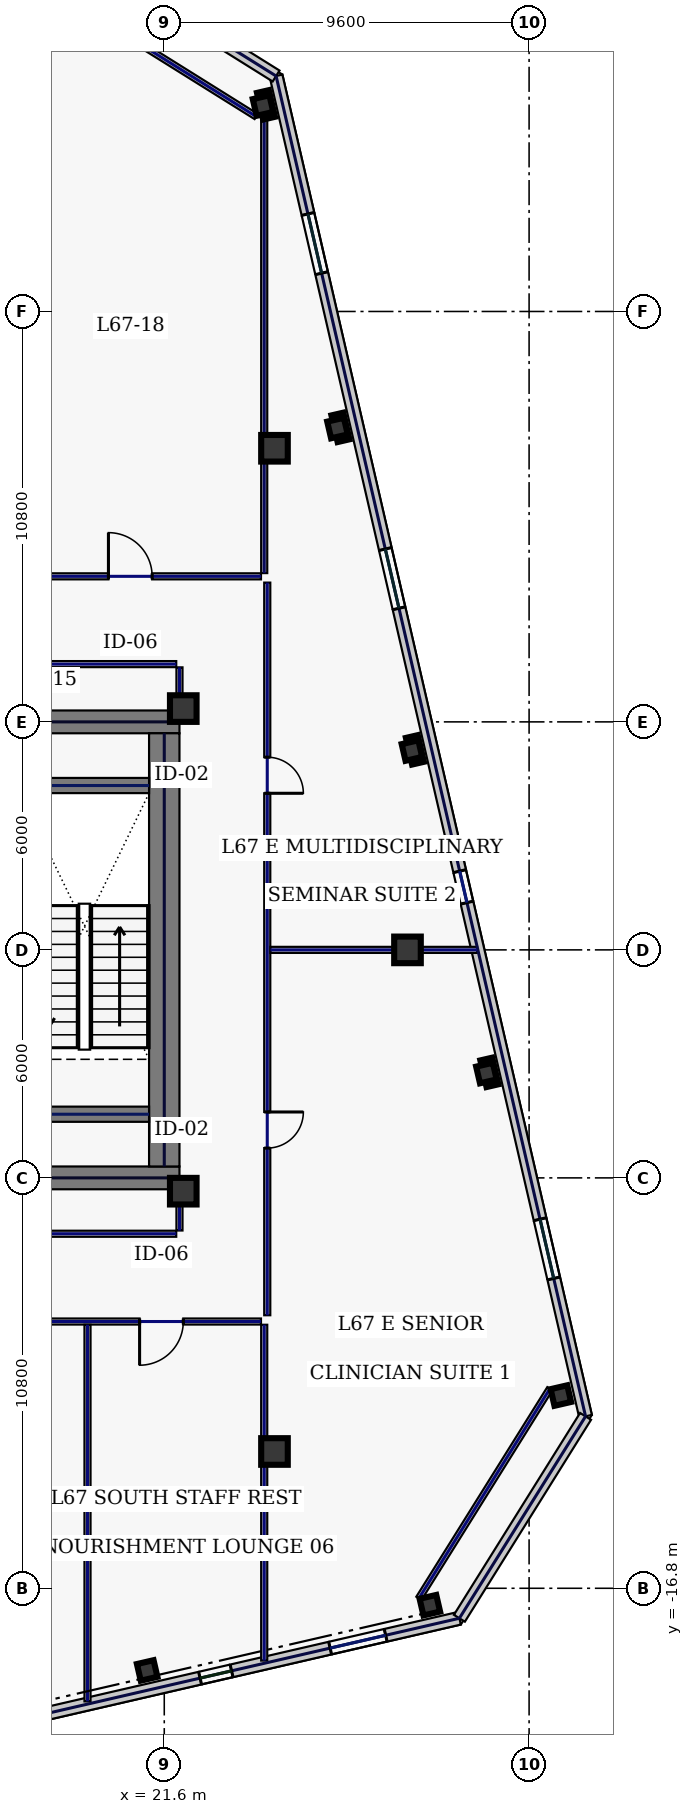
"""IFC4 building model, lengths in metres.
Left out: names, types, materials, properties, quantities, classifications, styles, units other than length and angle.
Written with IfcOpenShell. Run it as: python <this file> out.ifc"""

import sys

from ifc_helpers import new_model, si_unit, direction, frame, frame_2d, origin, origin_2d, place, context, subcontext, project, spatial, rectangle, hollow_rectangle, extrude, element, fill, save


model = new_model("IFC4")
c1 = context("Model", 3, precision=1e-05, world=origin(), true_north=direction((0.0, 1.0)))
c2 = subcontext(c1, "Body", "Model", "MODEL_VIEW")
j1 = project(units=[si_unit("LENGTHUNIT", "METRE"), si_unit("PLANEANGLEUNIT", "RADIAN")], contexts=[c1])
p1 = place(None, origin())
s1 = spatial("IfcSite", under=j1, at=p1, CompositionType="ELEMENT")
p2 = place(p1, origin())
s2 = spatial("IfcBuilding", under=s1, at=p2, CompositionType="ELEMENT")
p3 = place(p2, frame((0.0, 0.0, 289.0)))
s3 = spatial("IfcBuildingStorey", under=s2, at=p3, CompositionType="ELEMENT", Elevation=289.0)
for number, where, z_axis, x_axis in (
    (1, (10.5, 6.0, 0.0), (0.0, 0.0, 1.0), (1.0, 0.0, 0.0)),
    (2, (10.5, -6.0, 0.0), (0.0, 0.0, 1.0), (1.0, 0.0, 0.0)),
):
    element("IfcWall", number, at=place(p3, frame(where, z_axis=z_axis, x_axis=x_axis)), inside=s3, PredefinedType="SHEAR", context=c2, shape_type="SweptSolid", body=[
        extrude(rectangle(XDim=11.5, YDim=0.6, at=frame_2d((5.75, 0.0))), origin(), (0.0, 0.0, 1.0), 3.74),
    ])
p4 = place(p3, frame((21.6, -5.7, 0.0), z_axis=(0.0, 0.0, 1.0), x_axis=(0.0, 1.0, 0.0)))
e3 = element("IfcWall", 3, at=p4, inside=s3, PredefinedType="SHEAR", context=c2, shape_type="SweptSolid", body=[
    extrude(rectangle(XDim=11.4, YDim=0.8, at=frame_2d((5.7, 0.0))), origin(), (0.0, 0.0, 1.0), 3.74),
])
for number, where, z_axis, x_axis in (
    (4, (17.8, -4.325, 0.0), (0.0, 0.0, 1.0), (1.0, 0.0, 0.0)),
    (5, (17.8, 4.325, 0.0), (0.0, 0.0, 1.0), (1.0, 0.0, 0.0)),
):
    element("IfcWall", number, at=place(p3, frame(where, z_axis=z_axis, x_axis=x_axis)), inside=s3, PredefinedType="SHEAR", context=c2, shape_type="SweptSolid", body=[
        extrude(rectangle(XDim=3.4, YDim=0.4, at=frame_2d((1.7, 0.0))), origin(), (0.0, 0.0, 1.0), 3.74),
    ])
for number, where, z_axis, x_axis in (
    (6, (22.1, -6.35, 0.0), (0.0, 0.0, 1.0), (1.0, 0.0, 0.0)),
    (7, (22.1, 6.35, 0.0), (0.0, 0.0, 1.0), (1.0, 0.0, 0.0)),
    (8, (24.5, -13.2, 0.0), (0.0, 0.0, 1.0), (1.0, 0.0, 0.0)),
    (9, (24.5, 13.2, 0.0), (0.0, 0.0, 1.0), (1.0, 0.0, 0.0)),
    (10, (28.0, 0.0, 0.0), (0.0, 0.0, 1.0), (1.0, 0.0, 0.0)),
):
    element("IfcColumn", number, at=place(p3, frame(where, z_axis=z_axis, x_axis=x_axis)), inside=s3, PredefinedType="COLUMN", context=c2, shape_type="SweptSolid", body=[
        extrude(hollow_rectangle(XDim=0.7, YDim=0.7, WallThickness=0.032, at=origin_2d()), origin(), (0.0, 0.0, 1.0), 3.74),
    ])
for number, where, z_axis, x_axis in (
    (11, (21.15, -18.962, 0.0), (0.0, 0.0, 1.0), (0.974, 0.225, 0.0)),
    (12, (28.589, -17.245, 0.0), (0.0, 0.0, 1.0), (0.974, 0.225, 0.0)),
    (13, (32.036, -11.728, 0.0), (0.0, 0.0, 1.0), (0.974, 0.225, 0.0)),
    (14, (30.077, -3.241, 0.0), (0.0, 0.0, 1.0), (0.974, 0.225, 0.0)),
    (15, (28.117, 5.246, 0.0), (0.0, 0.0, 1.0), (0.974, 0.225, 0.0)),
    (16, (26.158, 13.732, 0.0), (0.0, 0.0, 1.0), (0.974, 0.225, 0.0)),
    (17, (24.198, 22.219, 0.0), (0.0, 0.0, 1.0), (0.974, 0.225, 0.0)),
):
    element("IfcColumn", number, at=place(p3, frame(where, z_axis=z_axis, x_axis=x_axis)), inside=s3, PredefinedType="COLUMN", context=c2, shape_type="SweptSolid", body=[
        extrude(hollow_rectangle(XDim=0.45, YDim=0.45, WallThickness=0.022, at=origin_2d()), origin(), (0.0, 0.0, 1.0), 3.74),
    ])
p5 = place(p3, frame((12.445, -21.495, 0.0), z_axis=(0.0, 0.0, 1.0), x_axis=(0.974369392164, 0.224953967767, 0.0)))
e18 = element("IfcWall", 18, at=p5, inside=s3, PredefinedType="STANDARD", context=c2, shape_type="SweptSolid", body=[
    extrude(rectangle(XDim=17.366, YDim=0.34, at=frame_2d((8.683, 0.0))), origin(), (0.0, 0.0, 1.0), 3.74),
])
p6 = place(p5, frame((2.729, 0.0, 0.9)))
e19 = element("IfcOpeningElement", 19, at=p6, cuts=e18, PredefinedType="OPENING", context=c2, shape_type="SweptSolid", body=[
    extrude(rectangle(XDim=1.5, YDim=2.0, at=frame_2d((0.75, 1.0))), frame((0.0, 0.18, 0.0), z_axis=(0.0, -1.0, 0.0), x_axis=(1.0, 0.0, 0.0)), (0.0, 0.0, 1.0), 0.36),
])
p7 = place(p5, frame((10.363, 0.0, 0.9)))
e20 = element("IfcOpeningElement", 20, at=p7, cuts=e18, PredefinedType="OPENING", context=c2, shape_type="SweptSolid", body=[
    extrude(rectangle(XDim=0.85, YDim=1.85, at=frame_2d((0.425, 0.925))), frame((0.0, 0.18, 0.0), z_axis=(0.0, -1.0, 0.0), x_axis=(1.0, 0.0, 0.0)), (0.0, 0.0, 1.0), 0.36),
])
p8 = place(p5, frame((13.875, 0.0, 0.9)))
e21 = element("IfcOpeningElement", 21, at=p8, cuts=e18, PredefinedType="OPENING", context=c2, shape_type="SweptSolid", body=[
    extrude(rectangle(XDim=1.5, YDim=2.0, at=frame_2d((0.75, 1.0))), frame((0.0, 0.18, 0.0), z_axis=(0.0, -1.0, 0.0), x_axis=(1.0, 0.0, 0.0)), (0.0, 0.0, 1.0), 0.36),
])
p9 = place(p3, frame((19.229, 26.316, 0.0), z_axis=(0.0, 0.0, 1.0), x_axis=(-0.974372473594, -0.224940620392, 0.0)))
e22 = element("IfcWall", 22, at=p9, inside=s3, PredefinedType="STANDARD", context=c2, shape_type="SweptSolid", body=[
    extrude(rectangle(XDim=17.366, YDim=0.34, at=frame_2d((8.683, 0.0))), origin(), (0.0, 0.0, 1.0), 3.74),
])
p10 = place(p9, frame((13.187, 0.0, 1.0)))
e23 = element("IfcOpeningElement", 23, at=p10, cuts=e22, PredefinedType="OPENING", context=c2, shape_type="SweptSolid", body=[
    extrude(rectangle(XDim=1.4, YDim=1.85, at=frame_2d((0.7, 0.925))), frame((0.0, 0.18, 0.0), z_axis=(0.0, -1.0, 0.0), x_axis=(1.0, 0.0, 0.0)), (0.0, 0.0, 1.0), 0.36),
])
p11 = place(p9, frame((9.676, 0.0, 1.0)))
e24 = element("IfcOpeningElement", 24, at=p11, cuts=e22, PredefinedType="OPENING", context=c2, shape_type="SweptSolid", body=[
    extrude(rectangle(XDim=1.4, YDim=1.85, at=frame_2d((0.7, 0.925))), frame((0.0, 0.18, 0.0), z_axis=(0.0, -1.0, 0.0), x_axis=(1.0, 0.0, 0.0)), (0.0, 0.0, 1.0), 0.36),
])
p12 = place(p9, frame((5.553, 0.0, 1.0)))
e25 = element("IfcOpeningElement", 25, at=p12, cuts=e22, PredefinedType="OPENING", context=c2, shape_type="SweptSolid", body=[
    extrude(rectangle(XDim=1.4, YDim=1.85, at=frame_2d((0.7, 0.925))), frame((0.0, 0.18, 0.0), z_axis=(0.0, -1.0, 0.0), x_axis=(1.0, 0.0, 0.0)), (0.0, 0.0, 1.0), 0.36),
])
p13 = place(p3, frame((32.686, -12.276, 0.0), z_axis=(0.0, 0.0, 1.0), x_axis=(-0.224953091034, 0.974369594576, 0.0)))
e26 = element("IfcWall", 26, at=p13, inside=s3, PredefinedType="STANDARD", context=c2, shape_type="SweptSolid", body=[
    extrude(rectangle(XDim=36.2, YDim=0.34, at=frame_2d((18.1, 0.0))), origin(), (0.0, 0.0, 1.0), 3.74),
])
p14 = place(p13, frame((3.725, 0.0, 0.58)))
e27 = element("IfcOpeningElement", 27, at=p14, cuts=e26, PredefinedType="OPENING", context=c2, shape_type="SweptSolid", body=[
    extrude(rectangle(XDim=1.6, YDim=2.3, at=frame_2d((0.8, 1.15))), frame((0.0, 0.18, 0.0), z_axis=(0.0, -1.0, 0.0), x_axis=(1.0, 0.0, 0.0)), (0.0, 0.0, 1.0), 0.36),
])
p15 = place(p13, frame((13.875, 0.0, 0.75)))
e28 = element("IfcOpeningElement", 28, at=p15, cuts=e26, PredefinedType="OPENING", context=c2, shape_type="SweptSolid", body=[
    extrude(rectangle(XDim=0.85, YDim=1.85, at=frame_2d((0.425, 0.925))), frame((0.0, 0.18, 0.0), z_axis=(0.0, -1.0, 0.0), x_axis=(1.0, 0.0, 0.0)), (0.0, 0.0, 1.0), 0.36),
])
p16 = place(p13, frame((21.825, 0.0, 0.58)))
e29 = element("IfcOpeningElement", 29, at=p16, cuts=e26, PredefinedType="OPENING", context=c2, shape_type="SweptSolid", body=[
    extrude(rectangle(XDim=1.6, YDim=2.3, at=frame_2d((0.8, 1.15))), frame((0.0, 0.18, 0.0), z_axis=(0.0, -1.0, 0.0), x_axis=(1.0, 0.0, 0.0)), (0.0, 0.0, 1.0), 0.36),
])
p17 = place(p13, frame((30.875, 0.0, 0.58)))
e30 = element("IfcOpeningElement", 30, at=p17, cuts=e26, PredefinedType="OPENING", context=c2, shape_type="SweptSolid", body=[
    extrude(rectangle(XDim=1.6, YDim=2.3, at=frame_2d((0.8, 1.15))), frame((0.0, 0.18, 0.0), z_axis=(0.0, -1.0, 0.0), x_axis=(1.0, 0.0, 0.0)), (0.0, 0.0, 1.0), 0.36),
])
for number, where, z_axis, x_axis in (
    (31, (29.366, -17.589, 0.0), (0.0, 0.0, 1.0), (0.53, 0.848, 0.0)),
    (32, (24.542, 22.996, 0.0), (0.0, 0.0, 1.0), (-0.848, 0.53, 0.0)),
):
    element("IfcWall", number, at=place(p3, frame(where, z_axis=z_axis, x_axis=x_axis)), inside=s3, PredefinedType="STANDARD", context=c2, shape_type="SweptSolid", body=[
        extrude(rectangle(XDim=6.265, YDim=0.34, at=frame_2d((3.132, 0.0))), origin(), (0.0, 0.0, 1.0), 3.74),
    ])
for number, where, z_axis, x_axis in (
    (33, (28.3, -17.065, 0.0), (0.0, 0.0, 1.0), (0.53, 0.848, 0.0)),
    (34, (24.018, 21.931, 0.0), (0.0, 0.0, 1.0), (-0.848, 0.53, 0.0)),
):
    element("IfcWall", number, at=place(p3, frame(where, z_axis=z_axis, x_axis=x_axis)), inside=s3, PredefinedType="PARTITIONING", context=c2, shape_type="SweptSolid", body=[
        extrude(rectangle(XDim=6.505, YDim=0.16, at=frame_2d((3.253, 0.0))), origin(), (0.0, 0.0, 1.0), 3.74),
    ])
p18 = place(p3, frame((-24.145, 9.83, 0.0), z_axis=(0.0, 0.0, 1.0), x_axis=(1.0, 0.0, 0.0)))
e35 = element("IfcWall", 35, at=p18, inside=s3, PredefinedType="PARTITIONING", context=c2, shape_type="SweptSolid", body=[
    extrude(rectangle(XDim=48.29, YDim=0.16, at=frame_2d((24.145, 0.0))), origin(), (0.0, 0.0, 1.0), 3.74),
])
p19 = place(p18, frame((2.044, 0.0, 0.0)))
e36 = element("IfcOpeningElement", 36, at=p19, cuts=e35, PredefinedType="OPENING", context=c2, shape_type="SweptSolid", body=[
    extrude(rectangle(XDim=0.95, YDim=2.2, at=frame_2d((0.475, 1.1))), frame((0.0, 0.09, 0.0), z_axis=(0.0, -1.0, 0.0), x_axis=(1.0, 0.0, 0.0)), (0.0, 0.0, 1.0), 0.18),
])
p20 = place(p18, frame((9.165, 0.0, 0.0)))
e37 = element("IfcOpeningElement", 37, at=p20, cuts=e35, PredefinedType="OPENING", context=c2, shape_type="SweptSolid", body=[
    extrude(rectangle(XDim=0.95, YDim=2.2, at=frame_2d((0.475, 1.1))), frame((0.0, 0.09, 0.0), z_axis=(0.0, -1.0, 0.0), x_axis=(1.0, 0.0, 0.0)), (0.0, 0.0, 1.0), 0.18),
])
p21 = place(p18, frame((17.705, 0.0, 0.0)))
e38 = element("IfcOpeningElement", 38, at=p21, cuts=e35, PredefinedType="OPENING", context=c2, shape_type="SweptSolid", body=[
    extrude(rectangle(XDim=1.3, YDim=2.2, at=frame_2d((0.65, 1.1))), frame((0.0, 0.09, 0.0), z_axis=(0.0, -1.0, 0.0), x_axis=(1.0, 0.0, 0.0)), (0.0, 0.0, 1.0), 0.18),
])
p22 = place(p18, frame((24.705, 0.0, 0.0)))
e39 = element("IfcOpeningElement", 39, at=p22, cuts=e35, PredefinedType="OPENING", context=c2, shape_type="SweptSolid", body=[
    extrude(rectangle(XDim=1.3, YDim=2.2, at=frame_2d((0.65, 1.1))), frame((0.0, 0.09, 0.0), z_axis=(0.0, -1.0, 0.0), x_axis=(1.0, 0.0, 0.0)), (0.0, 0.0, 1.0), 0.18),
])
p23 = place(p18, frame((31.405, 0.0, 0.0)))
e40 = element("IfcOpeningElement", 40, at=p23, cuts=e35, PredefinedType="OPENING", context=c2, shape_type="SweptSolid", body=[
    extrude(rectangle(XDim=1.3, YDim=2.2, at=frame_2d((0.65, 1.1))), frame((0.0, 0.09, 0.0), z_axis=(0.0, -1.0, 0.0), x_axis=(1.0, 0.0, 0.0)), (0.0, 0.0, 1.0), 0.18),
])
p24 = place(p18, frame((37.98, 0.0, 0.0)))
e41 = element("IfcOpeningElement", 41, at=p24, cuts=e35, PredefinedType="OPENING", context=c2, shape_type="SweptSolid", body=[
    extrude(rectangle(XDim=0.95, YDim=2.2, at=frame_2d((0.475, 1.1))), frame((0.0, 0.09, 0.0), z_axis=(0.0, -1.0, 0.0), x_axis=(1.0, 0.0, 0.0)), (0.0, 0.0, 1.0), 0.18),
])
p25 = place(p18, frame((44.276, 0.0, 0.0)))
e42 = element("IfcOpeningElement", 42, at=p25, cuts=e35, PredefinedType="OPENING", context=c2, shape_type="SweptSolid", body=[
    extrude(rectangle(XDim=1.15, YDim=2.2, at=frame_2d((0.575, 1.1))), frame((0.0, 0.09, 0.0), z_axis=(0.0, -1.0, 0.0), x_axis=(1.0, 0.0, 0.0)), (0.0, 0.0, 1.0), 0.18),
])
p26 = place(p3, frame((24.31, 9.665, 0.0), z_axis=(0.0, 0.0, 1.0), x_axis=(0.0, -1.0, 0.0)))
e43 = element("IfcWall", 43, at=p26, inside=s3, PredefinedType="PARTITIONING", context=c2, shape_type="SweptSolid", body=[
    extrude(rectangle(XDim=19.28, YDim=0.16, at=frame_2d((9.64, 0.0))), origin(), (0.0, 0.0, 1.0), 3.74),
])
p27 = place(p26, frame((13.931, 0.0, 0.0)))
e44 = element("IfcOpeningElement", 44, at=p27, cuts=e43, PredefinedType="OPENING", context=c2, shape_type="SweptSolid", body=[
    extrude(rectangle(XDim=0.95, YDim=2.2, at=frame_2d((0.475, 1.1))), frame((0.0, 0.09, 0.0), z_axis=(0.0, -1.0, 0.0), x_axis=(1.0, 0.0, 0.0)), (0.0, 0.0, 1.0), 0.18),
])
p28 = place(p26, frame((4.594, 0.0, 0.0)))
e45 = element("IfcOpeningElement", 45, at=p28, cuts=e43, PredefinedType="OPENING", context=c2, shape_type="SweptSolid", body=[
    extrude(rectangle(XDim=0.95, YDim=2.2, at=frame_2d((0.475, 1.1))), frame((0.0, 0.09, 0.0), z_axis=(0.0, -1.0, 0.0), x_axis=(1.0, 0.0, 0.0)), (0.0, 0.0, 1.0), 0.18),
])
p29 = place(p3, frame((24.145, -9.78, 0.0), z_axis=(0.0, 0.0, 1.0), x_axis=(-1.0, 0.0, 0.0)))
e46 = element("IfcWall", 46, at=p29, inside=s3, PredefinedType="PARTITIONING", context=c2, shape_type="SweptSolid", body=[
    extrude(rectangle(XDim=9.08, YDim=0.16, at=frame_2d((4.54, 0.0))), origin(), (0.0, 0.0, 1.0), 3.74),
])
p30 = place(p29, frame((2.044, 0.0, 0.0)))
e47 = element("IfcOpeningElement", 47, at=p30, cuts=e46, PredefinedType="OPENING", context=c2, shape_type="SweptSolid", body=[
    extrude(rectangle(XDim=1.15, YDim=2.2, at=frame_2d((0.575, 1.1))), frame((0.0, 0.09, 0.0), z_axis=(0.0, -1.0, 0.0), x_axis=(1.0, 0.0, 0.0)), (0.0, 0.0, 1.0), 0.18),
])
for number, where, z_axis, x_axis in (
    (48, (21.915, 7.52, 0.0), (0.0, 0.0, 1.0), (-1.0, 0.0, 0.0)),
    (49, (10.715, -7.47, 0.0), (0.0, 0.0, 1.0), (1.0, 0.0, 0.0)),
):
    element("IfcWall", number, at=place(p3, frame(where, z_axis=z_axis, x_axis=x_axis)), inside=s3, PredefinedType="PARTITIONING", context=c2, shape_type="SweptSolid", body=[
        extrude(rectangle(XDim=11.2, YDim=0.16, at=frame_2d((5.6, 0.0))), origin(), (0.0, 0.0, 1.0), 3.74),
    ])
p31 = place(p3, frame((22.0, -7.385, 0.0), z_axis=(0.0, 0.0, 1.0), x_axis=(0.0, 1.0, 0.0)))
e50 = element("IfcWall", 50, at=p31, inside=s3, PredefinedType="PARTITIONING", context=c2, shape_type="SweptSolid", body=[
    extrude(rectangle(XDim=0.965, YDim=0.16, at=frame_2d((0.482, 0.0))), origin(), (0.0, 0.0, 1.0), 3.74),
])
p32 = place(p3, frame((22.0, 6.42, 0.0), z_axis=(0.0, 0.0, 1.0), x_axis=(0.0, 1.0, 0.0)))
e51 = element("IfcWall", 51, at=p32, inside=s3, PredefinedType="PARTITIONING", context=c2, shape_type="SweptSolid", body=[
    extrude(rectangle(XDim=1.015, YDim=0.16, at=frame_2d((0.508, 0.0))), origin(), (0.0, 0.0, 1.0), 3.74),
])
p33 = place(p3, frame((24.23, 9.915, 0.0), z_axis=(0.0, 0.0, 1.0), x_axis=(0.0, 1.0, 0.0)))
e52 = element("IfcWall", 52, at=p33, inside=s3, PredefinedType="PARTITIONING", context=c2, shape_type="SweptSolid", body=[
    extrude(rectangle(XDim=12.656, YDim=0.16, at=frame_2d((6.328, 0.0))), origin(), (0.0, 0.0, 1.0), 3.185),
])
p34 = place(p3, frame((24.23, -18.703, 0.0), z_axis=(0.0, 0.0, 1.0), x_axis=(0.0, 1.0, 0.0)))
e53 = element("IfcWall", 53, at=p34, inside=s3, PredefinedType="PARTITIONING", context=c2, shape_type="SweptSolid", body=[
    extrude(rectangle(XDim=8.838, YDim=0.16, at=frame_2d((4.419, 0.0))), origin(), (0.0, 0.0, 1.0), 3.74),
])
p35 = place(p3, frame((19.58, -19.776, 0.0), z_axis=(0.0, 0.0, 1.0), x_axis=(0.0, 1.0, 0.0)))
e54 = element("IfcWall", 54, at=p35, inside=s3, PredefinedType="PARTITIONING", context=c2, shape_type="SweptSolid", body=[
    extrude(rectangle(XDim=9.911, YDim=0.16, at=frame_2d((4.956, 0.0))), origin(), (0.0, 0.0, 1.0), 3.74),
])
p36 = place(p3, frame((24.395, 0.0, 0.0), z_axis=(0.0, 0.0, 1.0), x_axis=(1.0, 0.0, 0.0)))
e55 = element("IfcWall", 55, at=p36, inside=s3, PredefinedType="PARTITIONING", context=c2, shape_type="SweptSolid", body=[
    extrude(rectangle(XDim=5.436, YDim=0.16, at=frame_2d((2.718, 0.0))), origin(), (0.0, 0.0, 1.0), 3.74),
])
p37 = place(p7, origin())
e56 = element("IfcWindow", 56, at=p37, inside=s3, PartitioningType="SINGLE_PANEL", PredefinedType="WINDOW", context=c2, shape_type="SweptSolid", body=[
    extrude(rectangle(XDim=0.85, YDim=1.85, at=frame_2d((0.425, 0.925))), frame((0.0, 0.03, 0.0), z_axis=(0.0, -1.0, 0.0), x_axis=(1.0, 0.0, 0.0)), (0.0, 0.0, 1.0), 0.06),
])
fill(e20, e56)
p38 = place(p8, origin())
e57 = element("IfcWindow", 57, at=p38, inside=s3, PartitioningType="SINGLE_PANEL", PredefinedType="WINDOW", context=c2, shape_type="SweptSolid", body=[
    extrude(rectangle(XDim=1.5, YDim=2.0, at=frame_2d((0.75, 1.0))), frame((0.0, 0.03, 0.0), z_axis=(0.0, -1.0, 0.0), x_axis=(1.0, 0.0, 0.0)), (0.0, 0.0, 1.0), 0.06),
])
fill(e21, e57)
p39 = place(p14, origin())
e58 = element("IfcWindow", 58, at=p39, inside=s3, PartitioningType="SINGLE_PANEL", PredefinedType="WINDOW", context=c2, shape_type="SweptSolid", body=[
    extrude(rectangle(XDim=1.6, YDim=2.3, at=frame_2d((0.8, 1.15))), frame((0.0, 0.03, 0.0), z_axis=(0.0, -1.0, 0.0), x_axis=(1.0, 0.0, 0.0)), (0.0, 0.0, 1.0), 0.06),
])
fill(e27, e58)
p40 = place(p15, origin())
e59 = element("IfcWindow", 59, at=p40, inside=s3, PartitioningType="SINGLE_PANEL", PredefinedType="WINDOW", context=c2, shape_type="SweptSolid", body=[
    extrude(rectangle(XDim=0.85, YDim=1.85, at=frame_2d((0.425, 0.925))), frame((0.0, 0.03, 0.0), z_axis=(0.0, -1.0, 0.0), x_axis=(1.0, 0.0, 0.0)), (0.0, 0.0, 1.0), 0.06),
])
fill(e28, e59)
p41 = place(p16, origin())
e60 = element("IfcWindow", 60, at=p41, inside=s3, PartitioningType="SINGLE_PANEL", PredefinedType="WINDOW", context=c2, shape_type="SweptSolid", body=[
    extrude(rectangle(XDim=1.6, YDim=2.3, at=frame_2d((0.8, 1.15))), frame((0.0, 0.03, 0.0), z_axis=(0.0, -1.0, 0.0), x_axis=(1.0, 0.0, 0.0)), (0.0, 0.0, 1.0), 0.06),
])
fill(e29, e60)
p42 = place(p17, origin())
e61 = element("IfcWindow", 61, at=p42, inside=s3, PartitioningType="SINGLE_PANEL", PredefinedType="WINDOW", context=c2, shape_type="SweptSolid", body=[
    extrude(rectangle(XDim=1.6, YDim=2.3, at=frame_2d((0.8, 1.15))), frame((0.0, 0.03, 0.0), z_axis=(0.0, -1.0, 0.0), x_axis=(1.0, 0.0, 0.0)), (0.0, 0.0, 1.0), 0.06),
])
fill(e30, e61)
p43 = place(p25, origin())
e62 = element("IfcDoor", 62, at=p43, inside=s3, OperationType="SINGLE_SWING_LEFT", PredefinedType="DOOR", context=c2, shape_type="SweptSolid", body=[
    extrude(rectangle(XDim=1.15, YDim=2.2, at=frame_2d((0.575, 1.1))), frame((0.0, 0.025, 0.0), z_axis=(0.0, -1.0, 0.0), x_axis=(1.0, 0.0, 0.0)), (0.0, 0.0, 1.0), 0.05),
])
fill(e42, e62)
p44 = place(p30, origin())
e63 = element("IfcDoor", 63, at=p44, inside=s3, OperationType="SINGLE_SWING_RIGHT", PredefinedType="DOOR", context=c2, shape_type="SweptSolid", body=[
    extrude(rectangle(XDim=1.15, YDim=2.2, at=frame_2d((0.575, 1.1))), frame((0.0, 0.025, 0.0), z_axis=(0.0, -1.0, 0.0), x_axis=(1.0, 0.0, 0.0)), (0.0, 0.0, 1.0), 0.05),
])
fill(e47, e63)
p45 = place(p27, origin())
e64 = element("IfcDoor", 64, at=p45, inside=s3, OperationType="SINGLE_SWING_LEFT", PredefinedType="DOOR", context=c2, shape_type="SweptSolid", body=[
    extrude(rectangle(XDim=0.95, YDim=2.2, at=frame_2d((0.475, 1.1))), frame((0.0, 0.025, 0.0), z_axis=(0.0, -1.0, 0.0), x_axis=(1.0, 0.0, 0.0)), (0.0, 0.0, 1.0), 0.05),
])
fill(e44, e64)
p46 = place(p28, origin())
e65 = element("IfcDoor", 65, at=p46, inside=s3, OperationType="SINGLE_SWING_RIGHT", PredefinedType="DOOR", context=c2, shape_type="SweptSolid", body=[
    extrude(rectangle(XDim=0.95, YDim=2.2, at=frame_2d((0.475, 1.1))), frame((0.0, 0.025, 0.0), z_axis=(0.0, -1.0, 0.0), x_axis=(1.0, 0.0, 0.0)), (0.0, 0.0, 1.0), 0.05),
])
fill(e45, e65)
save(model, sys.argv[1])
